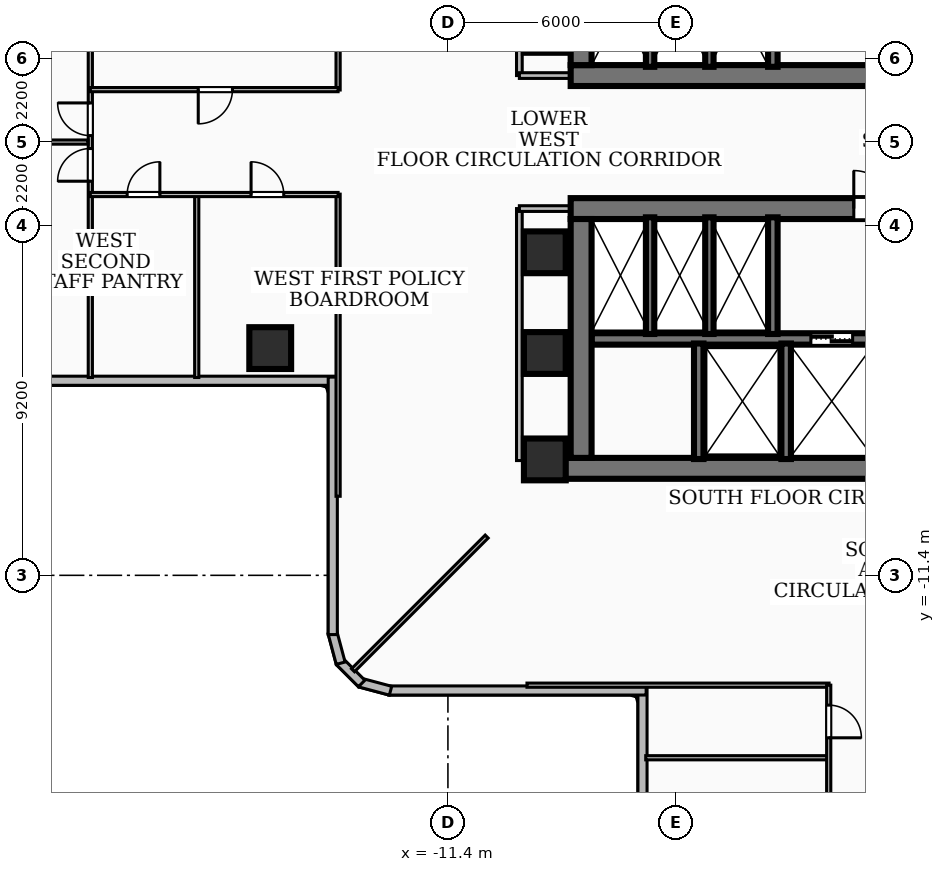
"""IFC4 building model, lengths in metres.
Left out: names, types, materials, properties, quantities, classifications, styles, units other than length and angle.
Written with IfcOpenShell. Run it as: python <this file> out.ifc"""

import sys

from ifc_helpers import new_model, si_unit, direction, frame, frame_2d, origin, origin_2d, place, context, subcontext, project, spatial, rectangle, extrude, element, fill, save


model = new_model("IFC4")
c1 = context("Model", 3, precision=1e-05, world=origin(), true_north=direction((0.0, 1.0)))
c2 = subcontext(c1, "Body", "Model", "MODEL_VIEW")
j1 = project(units=[si_unit("LENGTHUNIT", "METRE"), si_unit("PLANEANGLEUNIT", "RADIAN")], contexts=[c1])
p1 = place(None, origin())
s1 = spatial("IfcSite", under=j1, at=p1, CompositionType="ELEMENT")
p2 = place(p1, origin())
s2 = spatial("IfcBuilding", under=s1, at=p2, CompositionType="ELEMENT")
p3 = place(p2, frame((0.0, 0.0, 31.68)))
s3 = spatial("IfcBuildingStorey", under=s2, at=p3, CompositionType="ELEMENT", Elevation=31.68)
p4 = place(p3, frame((8.17, 1.75, 0.0), z_axis=(0.0, 0.0, 1.0), x_axis=(-1.0, 0.0, 0.0)))
e1 = element("IfcWall", 1, at=p4, inside=s3, PredefinedType="SHEAR", context=c2, shape_type="SweptSolid", body=[
    extrude(rectangle(XDim=16.34, YDim=0.55, at=frame_2d((8.17, 0.0))), origin(), (0.0, 0.0, 1.0), 3.34),
])
p5 = place(p4, frame((7.45, 0.0, 0.0)))
e2 = element("IfcOpeningElement", 2, at=p5, cuts=e1, PredefinedType="OPENING", context=c2, shape_type="SweptSolid", body=[
    extrude(rectangle(XDim=1.0, YDim=2.1, at=frame_2d((0.5, 1.05))), frame((0.0, 0.285, 0.0), z_axis=(0.0, -1.0, 0.0), x_axis=(1.0, 0.0, 0.0)), (0.0, 0.0, 1.0), 0.57),
])
p6 = place(p4, frame((3.4, 0.0, 0.0)))
e3 = element("IfcOpeningElement", 3, at=p6, cuts=e1, PredefinedType="OPENING", context=c2, shape_type="SweptSolid", body=[
    extrude(rectangle(XDim=0.9, YDim=2.06, at=frame_2d((0.45, 1.03))), frame((0.0, 0.285, 0.0), z_axis=(0.0, -1.0, 0.0), x_axis=(1.0, 0.0, 0.0)), (0.0, 0.0, 1.0), 0.57),
])
p7 = place(p4, frame((1.1, 0.0, 0.0)))
e4 = element("IfcOpeningElement", 4, at=p7, cuts=e1, PredefinedType="OPENING", context=c2, shape_type="SweptSolid", body=[
    extrude(rectangle(XDim=0.9, YDim=2.06, at=frame_2d((0.45, 1.03))), frame((0.0, 0.285, 0.0), z_axis=(0.0, -1.0, 0.0), x_axis=(1.0, 0.0, 0.0)), (0.0, 0.0, 1.0), 0.57),
])
p8 = place(p3, frame((-7.895, 2.025, 0.0), z_axis=(0.0, 0.0, 1.0), x_axis=(0.0, 1.0, 0.0)))
e5 = element("IfcWall", 5, at=p8, inside=s3, PredefinedType="SHEAR", context=c2, shape_type="SweptSolid", body=[
    extrude(rectangle(XDim=6.285, YDim=0.55, at=frame_2d((3.143, 0.0))), origin(), (0.0, 0.0, 1.0), 3.34),
])
p9 = place(p3, frame((8.78, -8.585, 0.0), z_axis=(0.0, 0.0, 1.0), x_axis=(-1.0, 0.0, 0.0)))
e6 = element("IfcWall", 6, at=p9, inside=s3, PredefinedType="SHEAR", context=c2, shape_type="SweptSolid", body=[
    extrude(rectangle(XDim=17.56, YDim=0.55, at=frame_2d((8.78, 0.0))), origin(), (0.0, 0.0, 1.0), 3.34),
])
p10 = place(p3, frame((-8.17, -1.75, 0.0), z_axis=(0.0, 0.0, 1.0), x_axis=(1.0, 0.0, 0.0)))
e7 = element("IfcWall", 7, at=p10, inside=s3, PredefinedType="SHEAR", context=c2, shape_type="SweptSolid", body=[
    extrude(rectangle(XDim=16.34, YDim=0.55, at=frame_2d((8.17, 0.0))), origin(), (0.0, 0.0, 1.0), 3.34),
])
p11 = place(p10, frame((7.45, 0.0, 0.0)))
e8 = element("IfcOpeningElement", 8, at=p11, cuts=e7, PredefinedType="OPENING", context=c2, shape_type="SweptSolid", body=[
    extrude(rectangle(XDim=1.0, YDim=2.1, at=frame_2d((0.5, 1.05))), frame((0.0, 0.285, 0.0), z_axis=(0.0, -1.0, 0.0), x_axis=(1.0, 0.0, 0.0)), (0.0, 0.0, 1.0), 0.57),
])
p12 = place(p10, frame((10.965, 0.0, 0.0)))
e9 = element("IfcOpeningElement", 9, at=p12, cuts=e7, PredefinedType="OPENING", context=c2, shape_type="SweptSolid", body=[
    extrude(rectangle(XDim=1.05, YDim=2.15, at=frame_2d((0.525, 1.075))), frame((0.0, 0.285, 0.0), z_axis=(0.0, -1.0, 0.0), x_axis=(1.0, 0.0, 0.0)), (0.0, 0.0, 1.0), 0.57),
])
p13 = place(p10, frame((12.525, 0.0, 0.0)))
e10 = element("IfcOpeningElement", 10, at=p13, cuts=e7, PredefinedType="OPENING", context=c2, shape_type="SweptSolid", body=[
    extrude(rectangle(XDim=1.05, YDim=2.15, at=frame_2d((0.525, 1.075))), frame((0.0, 0.285, 0.0), z_axis=(0.0, -1.0, 0.0), x_axis=(1.0, 0.0, 0.0)), (0.0, 0.0, 1.0), 0.57),
])
p14 = place(p10, frame((14.085, 0.0, 0.0)))
e11 = element("IfcOpeningElement", 11, at=p14, cuts=e7, PredefinedType="OPENING", context=c2, shape_type="SweptSolid", body=[
    extrude(rectangle(XDim=1.05, YDim=2.15, at=frame_2d((0.525, 1.075))), frame((0.0, 0.285, 0.0), z_axis=(0.0, -1.0, 0.0), x_axis=(1.0, 0.0, 0.0)), (0.0, 0.0, 1.0), 0.57),
])
p15 = place(p3, frame((-7.895, -8.31, 0.0), z_axis=(0.0, 0.0, 1.0), x_axis=(0.0, 1.0, 0.0)))
e12 = element("IfcWall", 12, at=p15, inside=s3, PredefinedType="SHEAR", context=c2, shape_type="SweptSolid", body=[
    extrude(rectangle(XDim=6.285, YDim=0.55, at=frame_2d((3.143, 0.0))), origin(), (0.0, 0.0, 1.0), 3.34),
])
p16 = place(p3, frame((-7.62, -5.18, 0.0), z_axis=(0.0, 0.0, 1.0), x_axis=(1.0, 0.0, 0.0)))
e13 = element("IfcWall", 13, at=p16, inside=s3, PredefinedType="SOLIDWALL", context=c2, shape_type="SweptSolid", body=[
    extrude(rectangle(XDim=15.24, YDim=0.3, at=frame_2d((7.62, 0.0))), origin(), (0.0, 0.0, 1.0), 3.34),
])
p17 = place(p16, frame((5.77, 0.0, 0.0)))
e14 = element("IfcOpeningElement", 14, at=p17, cuts=e13, PredefinedType="OPENING", context=c2, shape_type="SweptSolid", body=[
    extrude(rectangle(XDim=1.1, YDim=2.15, at=frame_2d((0.55, 1.075))), frame((0.0, 0.16, 0.0), z_axis=(0.0, -1.0, 0.0), x_axis=(1.0, 0.0, 0.0)), (0.0, 0.0, 1.0), 0.32),
])
p18 = place(p16, frame((7.97, 0.0, 0.0)))
e15 = element("IfcOpeningElement", 15, at=p18, cuts=e13, PredefinedType="OPENING", context=c2, shape_type="SweptSolid", body=[
    extrude(rectangle(XDim=1.0, YDim=2.1, at=frame_2d((0.5, 1.05))), frame((0.0, 0.16, 0.0), z_axis=(0.0, -1.0, 0.0), x_axis=(1.0, 0.0, 0.0)), (0.0, 0.0, 1.0), 0.32),
])
p19 = place(p3, frame((-2.85, 1.98, 0.0), z_axis=(0.0, 0.0, 1.0), x_axis=(0.0, 1.0, 0.0)))
e16 = element("IfcWall", 16, at=p19, inside=s3, PredefinedType="SOLIDWALL", context=c2, shape_type="SweptSolid", body=[
    extrude(rectangle(XDim=3.07, YDim=0.25, at=frame_2d((1.535, 0.0))), origin(), (0.0, 0.0, 1.0), 3.34),
])
for number, where, z_axis, x_axis in (
    (17, (-2.5, -8.34, 0.0), (0.0, 0.0, 1.0), (0.0, 1.0, 0.0)),
    (18, (-4.8, -8.34, 0.0), (0.0, 0.0, 1.0), (0.0, 1.0, 0.0)),
):
    element("IfcWall", number, at=place(p3, frame(where, z_axis=z_axis, x_axis=x_axis)), inside=s3, PredefinedType="SOLIDWALL", context=c2, shape_type="SweptSolid", body=[
        extrude(rectangle(XDim=3.04, YDim=0.25, at=frame_2d((1.52, 0.0))), origin(), (0.0, 0.0, 1.0), 3.34),
    ])
p20 = place(p3, frame((-2.85, -5.05, 0.0), z_axis=(0.0, 0.0, 1.0), x_axis=(0.0, 1.0, 0.0)))
e19 = element("IfcWall", 19, at=p20, inside=s3, PredefinedType="SOLIDWALL", context=c2, shape_type="SweptSolid", body=[
    extrude(rectangle(XDim=3.07, YDim=0.25, at=frame_2d((1.535, 0.0))), origin(), (0.0, 0.0, 1.0), 3.34),
])
for number, where, z_axis, x_axis in (
    (20, (-6.08, 1.98, 0.0), (0.0, 0.0, 1.0), (0.0, 1.0, 0.0)),
    (21, (-4.52, 1.98, 0.0), (0.0, 0.0, 1.0), (0.0, 1.0, 0.0)),
    (22, (-6.08, -5.05, 0.0), (0.0, 0.0, 1.0), (0.0, 1.0, 0.0)),
    (23, (-4.52, -5.05, 0.0), (0.0, 0.0, 1.0), (0.0, 1.0, 0.0)),
):
    element("IfcWall", number, at=place(p3, frame(where, z_axis=z_axis, x_axis=x_axis)), inside=s3, PredefinedType="SOLIDWALL", context=c2, shape_type="SweptSolid", body=[
        extrude(rectangle(XDim=3.07, YDim=0.22, at=frame_2d((1.535, 0.0))), origin(), (0.0, 0.0, 1.0), 3.34),
    ])
for number, where, z_axis, x_axis in (
    (24, (-8.85, -5.55, 0.0), (0.0, 0.0, 1.0), (1.0, 0.0, 0.0)),
    (25, (-8.85, -2.9, 0.0), (0.0, 0.0, 1.0), (1.0, 0.0, 0.0)),
    (26, (-8.85, 2.9, 0.0), (0.0, 0.0, 1.0), (1.0, 0.0, 0.0)),
    (27, (-8.85, -8.35, 0.0), (0.0, 0.0, 1.0), (1.0, 0.0, 0.0)),
    (28, (-16.076, -5.421, 0.0), (0.0, 0.0, 1.0), (1.0, 0.0, 0.0)),
):
    element("IfcColumn", number, at=place(p3, frame(where, z_axis=z_axis, x_axis=x_axis)), inside=s3, PredefinedType="COLUMN", context=c2, shape_type="SweptSolid", body=[
        extrude(rectangle(XDim=1.1, YDim=1.1, at=origin_2d()), origin(), (0.0, 0.0, 1.0), 3.6),
    ])
p21 = place(p3, frame((-14.334, -6.28, 0.0), z_axis=(0.0, 0.0, 1.0), x_axis=(-1.0, 0.0, 0.0)))
e29 = element("IfcWall", 29, at=p21, inside=s3, PredefinedType="SOLIDWALL", context=c2, shape_type="SweptSolid", body=[
    extrude(rectangle(XDim=16.875, YDim=0.24, at=frame_2d((8.438, 0.0))), origin(), (0.0, 0.0, 1.0), 2.644),
])
p22 = place(p3, frame((-6.28, -27.809, 0.0), z_axis=(0.0, 0.0, 1.0), x_axis=(0.0, 1.0, 0.0)))
e30 = element("IfcWall", 30, at=p22, inside=s3, PredefinedType="SOLIDWALL", context=c2, shape_type="SweptSolid", body=[
    extrude(rectangle(XDim=13.475, YDim=0.24, at=frame_2d((6.738, 0.0))), origin(), (0.0, 0.0, 1.0), 2.644),
])
p23 = place(p3, frame((-6.184, -14.43, 0.0), z_axis=(0.0, 0.0, 1.0), x_axis=(-1.0, 0.0, 0.0)))
e31 = element("IfcWall", 31, at=p23, inside=s3, PredefinedType="SOLIDWALL", context=c2, shape_type="SweptSolid", body=[
    extrude(rectangle(XDim=6.775, YDim=0.24, at=frame_2d((3.387, 0.0))), origin(), (0.0, 0.0, 1.0), 2.644),
])
p24 = place(p3, frame((-12.91, -14.436, 0.0), z_axis=(0.0, 0.0, 1.0), x_axis=(-0.966161677396, 0.257937227116, 0.0)))
e32 = element("IfcWall", 32, at=p24, inside=s3, PredefinedType="SOLIDWALL", context=c2, shape_type="SweptSolid", body=[
    extrude(rectangle(XDim=0.83, YDim=0.24, at=frame_2d((0.415, 0.0))), origin(), (0.0, 0.0, 1.0), 3.34),
])
p25 = place(p3, frame((-13.67, -14.246, 0.0), z_axis=(0.0, 0.0, 1.0), x_axis=(-0.707106781187, 0.707106781187, 0.0)))
e33 = element("IfcWall", 33, at=p25, inside=s3, PredefinedType="SOLIDWALL", context=c2, shape_type="SweptSolid", body=[
    extrude(rectangle(XDim=0.815, YDim=0.24, at=frame_2d((0.407, 0.0))), origin(), (0.0, 0.0, 1.0), 3.34),
])
p26 = place(p3, frame((-14.222, -13.712, 0.0), z_axis=(0.0, 0.0, 1.0), x_axis=(-0.257937227116, 0.966161677396, 0.0)))
e34 = element("IfcWall", 34, at=p26, inside=s3, PredefinedType="SOLIDWALL", context=c2, shape_type="SweptSolid", body=[
    extrude(rectangle(XDim=0.83, YDim=0.24, at=frame_2d((0.415, 0.0))), origin(), (0.0, 0.0, 1.0), 3.34),
])
p27 = place(p3, frame((-14.43, -12.959, 0.0), z_axis=(0.0, 0.0, 1.0), x_axis=(0.0, 1.0, 0.0)))
e35 = element("IfcWall", 35, at=p27, inside=s3, PredefinedType="SOLIDWALL", context=c2, shape_type="SweptSolid", body=[
    extrude(rectangle(XDim=6.775, YDim=0.24, at=frame_2d((3.387, 0.0))), origin(), (0.0, 0.0, 1.0), 2.644),
])
p28 = place(p3, frame((-9.52, 1.75, 0.0), z_axis=(0.0, 0.0, 1.0), x_axis=(0.0, 1.0, 0.0)))
e36 = element("IfcWall", 36, at=p28, inside=s3, PredefinedType="PARTITIONING", context=c2, shape_type="SweptSolid", body=[
    extrude(rectangle(XDim=6.63, YDim=0.15, at=frame_2d((3.315, 0.0))), origin(), (0.0, 0.0, 1.0), 2.421),
])
p29 = place(p3, frame((-7.85, 1.75, 0.0), z_axis=(0.0, 0.0, 1.0), x_axis=(-1.0, 0.0, 0.0)))
e37 = element("IfcWall", 37, at=p29, inside=s3, PredefinedType="PARTITIONING", context=c2, shape_type="SweptSolid", body=[
    extrude(rectangle(XDim=1.67, YDim=0.15, at=frame_2d((0.835, 0.0))), origin(), (0.0, 0.0, 1.0), 2.405),
])
p30 = place(p3, frame((-9.52, -8.38, 0.0), z_axis=(0.0, 0.0, 1.0), x_axis=(0.0, 1.0, 0.0)))
e38 = element("IfcWall", 38, at=p30, inside=s3, PredefinedType="PARTITIONING", context=c2, shape_type="SweptSolid", body=[
    extrude(rectangle(XDim=6.63, YDim=0.15, at=frame_2d((3.315, 0.0))), origin(), (0.0, 0.0, 1.0), 2.421),
])
p31 = place(p3, frame((-7.85, -1.75, 0.0), z_axis=(0.0, 0.0, 1.0), x_axis=(-1.0, 0.0, 0.0)))
e39 = element("IfcWall", 39, at=p31, inside=s3, PredefinedType="PARTITIONING", context=c2, shape_type="SweptSolid", body=[
    extrude(rectangle(XDim=1.67, YDim=0.15, at=frame_2d((0.835, 0.0))), origin(), (0.0, 0.0, 1.0), 2.405),
])
p32 = place(p3, frame((-10.38, -10.38, 0.0), z_axis=(0.0, 0.0, 1.0), x_axis=(-0.707106781187, -0.707106781187, 0.0)))
e40 = element("IfcWall", 40, at=p32, inside=s3, PredefinedType="PARTITIONING", context=c2, shape_type="SweptSolid", body=[
    extrude(rectangle(XDim=4.975, YDim=0.11, at=frame_2d((2.488, 0.0))), origin(), (0.0, 0.0, 1.0), 2.644),
])
for number, where, z_axis, x_axis in (
    (41, (-14.29, -1.37, 0.0), (0.0, 0.0, 1.0), (0.0, -1.0, 0.0)),
    (42, (-14.29, 9.32, 0.0), (0.0, 0.0, 1.0), (0.0, -1.0, 0.0)),
):
    element("IfcWall", number, at=place(p3, frame(where, z_axis=z_axis, x_axis=x_axis)), inside=s3, PredefinedType="PARTITIONING", context=c2, shape_type="SweptSolid", body=[
        extrude(rectangle(XDim=7.95, YDim=0.11, at=frame_2d((3.975, 0.0))), origin(), (0.0, 0.0, 1.0), 2.421),
    ])
p33 = place(p3, frame((-18.01, -1.4, 0.0), z_axis=(0.0, 0.0, 1.0), x_axis=(0.0, -1.0, 0.0)))
e43 = element("IfcWall", 43, at=p33, inside=s3, PredefinedType="PARTITIONING", context=c2, shape_type="SweptSolid", body=[
    extrude(rectangle(XDim=4.795, YDim=0.11, at=frame_2d((2.397, 0.0))), origin(), (0.0, 0.0, 1.0), 2.421),
])
p34 = place(p3, frame((-20.81, -1.38, 0.0), z_axis=(0.0, 0.0, 1.0), x_axis=(1.0, 0.0, 0.0)))
e44 = element("IfcWall", 44, at=p34, inside=s3, PredefinedType="PARTITIONING", context=c2, shape_type="SweptSolid", body=[
    extrude(rectangle(XDim=6.52, YDim=0.11, at=frame_2d((3.26, 0.0))), origin(), (0.0, 0.0, 1.0), 2.869),
])
p35 = place(p34, frame((4.23, 0.0, 0.0)))
e45 = element("IfcOpeningElement", 45, at=p35, cuts=e44, PredefinedType="OPENING", context=c2, shape_type="SweptSolid", body=[
    extrude(rectangle(XDim=0.86, YDim=2.04, at=frame_2d((0.43, 1.02))), frame((0.0, 0.065, 0.0), z_axis=(0.0, -1.0, 0.0), x_axis=(1.0, 0.0, 0.0)), (0.0, 0.0, 1.0), 0.13),
])
p36 = place(p34, frame((0.97, 0.0, 0.0)))
e46 = element("IfcOpeningElement", 46, at=p36, cuts=e44, PredefinedType="OPENING", context=c2, shape_type="SweptSolid", body=[
    extrude(rectangle(XDim=0.86, YDim=2.04, at=frame_2d((0.43, 1.02))), frame((0.0, 0.065, 0.0), z_axis=(0.0, -1.0, 0.0), x_axis=(1.0, 0.0, 0.0)), (0.0, 0.0, 1.0), 0.13),
])
p37 = place(p3, frame((-14.29, 1.38, 0.0), z_axis=(0.0, 0.0, 1.0), x_axis=(-1.0, 0.0, 0.0)))
e47 = element("IfcWall", 47, at=p37, inside=s3, PredefinedType="PARTITIONING", context=c2, shape_type="SweptSolid", body=[
    extrude(rectangle(XDim=6.52, YDim=0.11, at=frame_2d((3.26, 0.0))), origin(), (0.0, 0.0, 1.0), 2.869),
])
p38 = place(p37, frame((2.78, 0.0, 0.0)))
e48 = element("IfcOpeningElement", 48, at=p38, cuts=e47, PredefinedType="OPENING", context=c2, shape_type="SweptSolid", body=[
    extrude(rectangle(XDim=0.9, YDim=2.06, at=frame_2d((0.45, 1.03))), frame((0.0, 0.065, 0.0), z_axis=(0.0, -1.0, 0.0), x_axis=(1.0, 0.0, 0.0)), (0.0, 0.0, 1.0), 0.13),
])
p39 = place(p3, frame((-20.87, 0.0, 0.0), z_axis=(0.0, 0.0, 1.0), x_axis=(-1.0, 0.0, 0.0)))
e49 = element("IfcWall", 49, at=p39, inside=s3, PredefinedType="PARTITIONING", context=c2, shape_type="SweptSolid", body=[
    extrude(rectangle(XDim=11.725, YDim=0.11, at=frame_2d((5.862, 0.0))), origin(), (0.0, 0.0, 1.0), 2.72),
])
p40 = place(p3, frame((-20.81, -6.195, 0.0), z_axis=(0.0, 0.0, 1.0), x_axis=(0.0, 1.0, 0.0)))
e50 = element("IfcWall", 50, at=p40, inside=s3, PredefinedType="PARTITIONING", context=c2, shape_type="SweptSolid", body=[
    extrude(rectangle(XDim=12.39, YDim=0.11, at=frame_2d((6.195, 0.0))), origin(), (0.0, 0.0, 1.0), 2.421),
])
p41 = place(p40, frame((6.365, 0.0, 0.0)))
e51 = element("IfcOpeningElement", 51, at=p41, cuts=e50, PredefinedType="OPENING", context=c2, shape_type="SweptSolid", body=[
    extrude(rectangle(XDim=0.86, YDim=2.04, at=frame_2d((0.43, 1.02))), frame((0.0, 0.065, 0.0), z_axis=(0.0, -1.0, 0.0), x_axis=(1.0, 0.0, 0.0)), (0.0, 0.0, 1.0), 0.13),
])
p42 = place(p40, frame((5.165, 0.0, 0.0)))
e52 = element("IfcOpeningElement", 52, at=p42, cuts=e50, PredefinedType="OPENING", context=c2, shape_type="SweptSolid", body=[
    extrude(rectangle(XDim=0.86, YDim=2.04, at=frame_2d((0.43, 1.02))), frame((0.0, 0.065, 0.0), z_axis=(0.0, -1.0, 0.0), x_axis=(1.0, 0.0, 0.0)), (0.0, 0.0, 1.0), 0.13),
])
p43 = place(p3, frame((-9.32, -14.29, 0.0), z_axis=(0.0, 0.0, 1.0), x_axis=(1.0, 0.0, 0.0)))
e53 = element("IfcWall", 53, at=p43, inside=s3, PredefinedType="PARTITIONING", context=c2, shape_type="SweptSolid", body=[
    extrude(rectangle(XDim=7.95, YDim=0.11, at=frame_2d((3.975, 0.0))), origin(), (0.0, 0.0, 1.0), 2.421),
])
p44 = place(p3, frame((-6.195, -16.2, 0.0), z_axis=(0.0, 0.0, 1.0), x_axis=(1.0, 0.0, 0.0)))
e54 = element("IfcWall", 54, at=p44, inside=s3, PredefinedType="PARTITIONING", context=c2, shape_type="SweptSolid", body=[
    extrude(rectangle(XDim=4.795, YDim=0.11, at=frame_2d((2.397, 0.0))), origin(), (0.0, 0.0, 1.0), 2.421),
])
p45 = place(p3, frame((-1.38, -14.29, 0.0), z_axis=(0.0, 0.0, 1.0), x_axis=(0.0, -1.0, 0.0)))
e55 = element("IfcWall", 55, at=p45, inside=s3, PredefinedType="PARTITIONING", context=c2, shape_type="SweptSolid", body=[
    extrude(rectangle(XDim=5.98, YDim=0.11, at=frame_2d((2.99, 0.0))), origin(), (0.0, 0.0, 1.0), 2.869),
])
p46 = place(p45, frame((0.525, 0.0, 0.0)))
e56 = element("IfcOpeningElement", 56, at=p46, cuts=e55, PredefinedType="OPENING", context=c2, shape_type="SweptSolid", body=[
    extrude(rectangle(XDim=0.86, YDim=2.04, at=frame_2d((0.43, 1.02))), frame((0.0, 0.065, 0.0), z_axis=(0.0, -1.0, 0.0), x_axis=(1.0, 0.0, 0.0)), (0.0, 0.0, 1.0), 0.13),
])
p47 = place(p45, frame((3.515, 0.0, 0.0)))
e57 = element("IfcOpeningElement", 57, at=p47, cuts=e55, PredefinedType="OPENING", context=c2, shape_type="SweptSolid", body=[
    extrude(rectangle(XDim=0.86, YDim=2.04, at=frame_2d((0.43, 1.02))), frame((0.0, 0.065, 0.0), z_axis=(0.0, -1.0, 0.0), x_axis=(1.0, 0.0, 0.0)), (0.0, 0.0, 1.0), 0.13),
])
p48 = place(p11, origin())
e58 = element("IfcDoor", 58, at=p48, inside=s3, OperationType="SINGLE_SWING_LEFT", PredefinedType="DOOR", context=c2, shape_type="SweptSolid", body=[
    extrude(rectangle(XDim=1.0, YDim=2.1, at=frame_2d((0.5, 1.05))), frame((0.0, 0.025, 0.0), z_axis=(0.0, -1.0, 0.0), x_axis=(1.0, 0.0, 0.0)), (0.0, 0.0, 1.0), 0.05),
])
fill(e8, e58)
p49 = place(p17, origin())
e59 = element("IfcDoor", 59, at=p49, inside=s3, OperationType="DOUBLE_DOOR_SLIDING", PredefinedType="DOOR", context=c2, shape_type="SweptSolid", body=[
    extrude(rectangle(XDim=1.1, YDim=2.15, at=frame_2d((0.55, 1.075))), frame((0.0, 0.025, 0.0), z_axis=(0.0, -1.0, 0.0), x_axis=(1.0, 0.0, 0.0)), (0.0, 0.0, 1.0), 0.05),
])
fill(e14, e59)
p50 = place(p35, origin())
e60 = element("IfcDoor", 60, at=p50, inside=s3, OperationType="SINGLE_SWING_LEFT", PredefinedType="DOOR", context=c2, shape_type="SweptSolid", body=[
    extrude(rectangle(XDim=0.86, YDim=2.04, at=frame_2d((0.43, 1.02))), frame((0.0, 0.025, 0.0), z_axis=(0.0, -1.0, 0.0), x_axis=(1.0, 0.0, 0.0)), (0.0, 0.0, 1.0), 0.05),
])
fill(e45, e60)
p51 = place(p36, origin())
e61 = element("IfcDoor", 61, at=p51, inside=s3, OperationType="SINGLE_SWING_RIGHT", PredefinedType="DOOR", context=c2, shape_type="SweptSolid", body=[
    extrude(rectangle(XDim=0.86, YDim=2.04, at=frame_2d((0.43, 1.02))), frame((0.0, 0.025, 0.0), z_axis=(0.0, -1.0, 0.0), x_axis=(1.0, 0.0, 0.0)), (0.0, 0.0, 1.0), 0.05),
])
fill(e46, e61)
p52 = place(p38, origin())
e62 = element("IfcDoor", 62, at=p52, inside=s3, OperationType="SINGLE_SWING_RIGHT", PredefinedType="DOOR", context=c2, shape_type="SweptSolid", body=[
    extrude(rectangle(XDim=0.9, YDim=2.06, at=frame_2d((0.45, 1.03))), frame((0.0, 0.025, 0.0), z_axis=(0.0, -1.0, 0.0), x_axis=(1.0, 0.0, 0.0)), (0.0, 0.0, 1.0), 0.05),
])
fill(e48, e62)
p53 = place(p41, origin())
e63 = element("IfcDoor", 63, at=p53, inside=s3, OperationType="SINGLE_SWING_RIGHT", PredefinedType="DOOR", context=c2, shape_type="SweptSolid", body=[
    extrude(rectangle(XDim=0.86, YDim=2.04, at=frame_2d((0.43, 1.02))), frame((0.0, 0.025, 0.0), z_axis=(0.0, -1.0, 0.0), x_axis=(1.0, 0.0, 0.0)), (0.0, 0.0, 1.0), 0.05),
])
fill(e51, e63)
p54 = place(p42, origin())
e64 = element("IfcDoor", 64, at=p54, inside=s3, OperationType="SINGLE_SWING_LEFT", PredefinedType="DOOR", context=c2, shape_type="SweptSolid", body=[
    extrude(rectangle(XDim=0.86, YDim=2.04, at=frame_2d((0.43, 1.02))), frame((0.0, 0.025, 0.0), z_axis=(0.0, -1.0, 0.0), x_axis=(1.0, 0.0, 0.0)), (0.0, 0.0, 1.0), 0.05),
])
fill(e52, e64)
p55 = place(p46, origin())
e65 = element("IfcDoor", 65, at=p55, inside=s3, OperationType="SINGLE_SWING_RIGHT", PredefinedType="DOOR", context=c2, shape_type="SweptSolid", body=[
    extrude(rectangle(XDim=0.86, YDim=2.04, at=frame_2d((0.43, 1.02))), frame((0.0, 0.025, 0.0), z_axis=(0.0, -1.0, 0.0), x_axis=(1.0, 0.0, 0.0)), (0.0, 0.0, 1.0), 0.05),
])
fill(e56, e65)
save(model, sys.argv[1])
